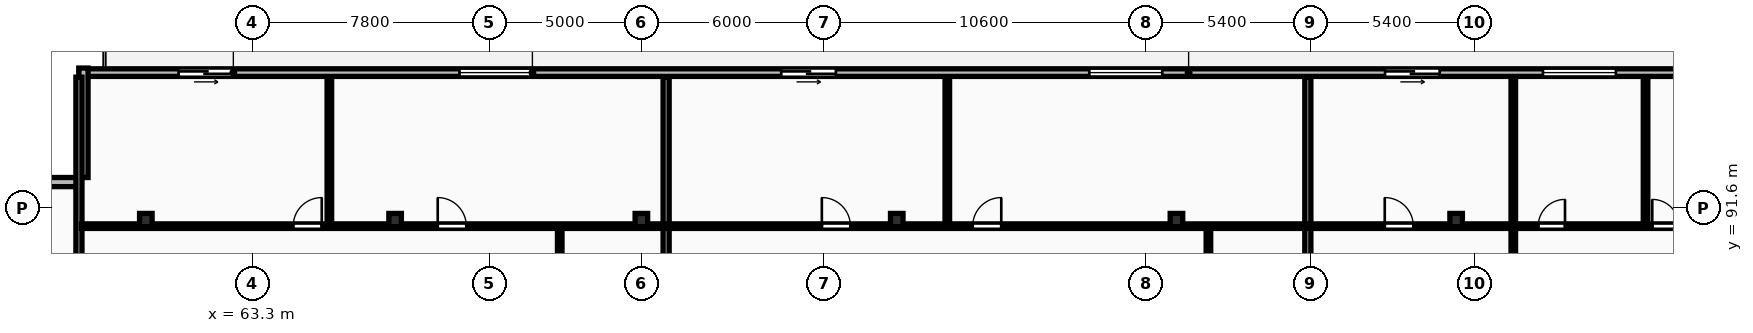
"""IFC4 building model, lengths in metres.
Left out: names, types, materials, properties, quantities, classifications, styles, units other than length and angle.
Written with IfcOpenShell. Run it as: python <this file> out.ifc"""

import sys

from ifc_helpers import new_model, si_unit, direction, frame, frame_2d, origin, origin_2d, place, context, subcontext, project, spatial, rectangle, i_section, extrude, element, fill, save


model = new_model("IFC4")
c1 = context("Model", 3, precision=1e-05, world=origin(), true_north=direction((0.0, 1.0)))
c2 = subcontext(c1, "Body", "Model", "MODEL_VIEW")
j1 = project(units=[si_unit("LENGTHUNIT", "METRE"), si_unit("PLANEANGLEUNIT", "RADIAN")], contexts=[c1])
p1 = place(None, origin())
s1 = spatial("IfcSite", under=j1, at=p1, CompositionType="ELEMENT")
p2 = place(p1, origin())
s2 = spatial("IfcBuilding", under=s1, at=p2, CompositionType="ELEMENT")
p3 = place(p2, frame((0.0, 0.0, 139.3)))
s3 = spatial("IfcBuildingStorey", under=s2, at=p3, CompositionType="ELEMENT", Elevation=139.3)
for number, where, z_axis, x_axis in (
    (1, (59.8, 91.2, 0.0), (0.0, 0.0, 1.0), (1.0, 0.0, 0.0)),
    (2, (68.0, 91.2, 0.0), (0.0, 0.0, 1.0), (1.0, 0.0, 0.0)),
    (3, (76.1, 91.2, 0.0), (0.0, 0.0, 1.0), (1.0, 0.0, 0.0)),
    (4, (84.5, 91.2, 0.0), (0.0, 0.0, 1.0), (1.0, 0.0, 0.0)),
    (5, (93.7, 91.2, 0.0), (0.0, 0.0, 1.0), (1.0, 0.0, 0.0)),
    (6, (102.9, 91.2, 0.0), (0.0, 0.0, 1.0), (1.0, 0.0, 0.0)),
):
    element("IfcColumn", number, at=place(p3, frame(where, z_axis=z_axis, x_axis=x_axis)), inside=s3, PredefinedType="COLUMN", context=c2, shape_type="SweptSolid", body=[
        extrude(i_section(OverallWidth=0.412, OverallDepth=0.437, WebThickness=0.036, FlangeThickness=0.052, FilletRadius=0.015, at=origin_2d()), origin(), (0.0, 0.0, 1.0), 3.6),
    ])
p4 = place(p3, frame((130.6, 96.05, 0.0), z_axis=(0.0, 0.0, 1.0), x_axis=(-1.0, 0.0, 0.0)))
e7 = element("IfcWall", 7, at=p4, inside=s3, PredefinedType="STANDARD", context=c2, shape_type="SweptSolid", body=[
    extrude(rectangle(XDim=73.0, YDim=0.25, at=frame_2d((36.5, 0.0))), origin(), (0.0, 0.0, 1.0), 3.31),
])
p5 = place(p4, frame((67.921, 0.0, 0.0)))
e8 = element("IfcOpeningElement", 8, at=p5, cuts=e7, PredefinedType="OPENING", context=c2, shape_type="SweptSolid", body=[
    extrude(rectangle(XDim=1.8, YDim=2.2, at=frame_2d((0.9, 1.1))), frame((0.0, 0.135, 0.0), z_axis=(0.0, -1.0, 0.0), x_axis=(1.0, 0.0, 0.0)), (0.0, 0.0, 1.0), 0.27),
])
p6 = place(p4, frame((58.084, 0.0, 0.85)))
e9 = element("IfcOpeningElement", 9, at=p6, cuts=e7, PredefinedType="OPENING", context=c2, shape_type="SweptSolid", body=[
    extrude(rectangle(XDim=2.4, YDim=1.9, at=frame_2d((1.2, 0.95))), frame((0.0, 0.135, 0.0), z_axis=(0.0, -1.0, 0.0), x_axis=(1.0, 0.0, 0.0)), (0.0, 0.0, 1.0), 0.27),
])
p7 = place(p4, frame((48.101, 0.0, 0.0)))
e10 = element("IfcOpeningElement", 10, at=p7, cuts=e7, PredefinedType="OPENING", context=c2, shape_type="SweptSolid", body=[
    extrude(rectangle(XDim=1.8, YDim=2.2, at=frame_2d((0.9, 1.1))), frame((0.0, 0.135, 0.0), z_axis=(0.0, -1.0, 0.0), x_axis=(1.0, 0.0, 0.0)), (0.0, 0.0, 1.0), 0.27),
])
p8 = place(p4, frame((37.368, 0.0, 0.85)))
e11 = element("IfcOpeningElement", 11, at=p8, cuts=e7, PredefinedType="OPENING", context=c2, shape_type="SweptSolid", body=[
    extrude(rectangle(XDim=2.4, YDim=1.9, at=frame_2d((1.2, 0.95))), frame((0.0, 0.135, 0.0), z_axis=(0.0, -1.0, 0.0), x_axis=(1.0, 0.0, 0.0)), (0.0, 0.0, 1.0), 0.27),
])
p9 = place(p4, frame((22.445, 0.0, 0.85)))
e12 = element("IfcOpeningElement", 12, at=p9, cuts=e7, PredefinedType="OPENING", context=c2, shape_type="SweptSolid", body=[
    extrude(rectangle(XDim=2.4, YDim=1.9, at=frame_2d((1.2, 0.95))), frame((0.0, 0.135, 0.0), z_axis=(0.0, -1.0, 0.0), x_axis=(1.0, 0.0, 0.0)), (0.0, 0.0, 1.0), 0.27),
])
p10 = place(p4, frame((17.845, 0.0, 0.85)))
e13 = element("IfcOpeningElement", 13, at=p10, cuts=e7, PredefinedType="OPENING", context=c2, shape_type="SweptSolid", body=[
    extrude(rectangle(XDim=2.4, YDim=1.9, at=frame_2d((1.2, 0.95))), frame((0.0, 0.135, 0.0), z_axis=(0.0, -1.0, 0.0), x_axis=(1.0, 0.0, 0.0)), (0.0, 0.0, 1.0), 0.27),
])
p11 = place(p4, frame((28.239, 0.0, 0.0)))
e14 = element("IfcOpeningElement", 14, at=p11, cuts=e7, PredefinedType="OPENING", context=c2, shape_type="SweptSolid", body=[
    extrude(rectangle(XDim=1.8, YDim=2.2, at=frame_2d((0.9, 1.1))), frame((0.0, 0.135, 0.0), z_axis=(0.0, -1.0, 0.0), x_axis=(1.0, 0.0, 0.0)), (0.0, 0.0, 1.0), 0.27),
])
p12 = place(p4, frame((14.599, 0.0, 0.85)))
e15 = element("IfcOpeningElement", 15, at=p12, cuts=e7, PredefinedType="OPENING", context=c2, shape_type="SweptSolid", body=[
    extrude(rectangle(XDim=1.8, YDim=1.8, at=frame_2d((0.9, 0.9))), frame((0.0, 0.135, 0.0), z_axis=(0.0, -1.0, 0.0), x_axis=(1.0, 0.0, 0.0)), (0.0, 0.0, 1.0), 0.27),
])
p13 = place(p4, frame((8.234, 0.0, 0.0)))
e16 = element("IfcOpeningElement", 16, at=p13, cuts=e7, PredefinedType="OPENING", context=c2, shape_type="SweptSolid", body=[
    extrude(rectangle(XDim=1.8, YDim=2.2, at=frame_2d((0.9, 1.1))), frame((0.0, 0.135, 0.0), z_axis=(0.0, -1.0, 0.0), x_axis=(1.0, 0.0, 0.0)), (0.0, 0.0, 1.0), 0.27),
])
p14 = place(p4, frame((0.9, 0.0, 0.85)))
e17 = element("IfcOpeningElement", 17, at=p14, cuts=e7, PredefinedType="OPENING", context=c2, shape_type="SweptSolid", body=[
    extrude(rectangle(XDim=2.4, YDim=1.9, at=frame_2d((1.2, 0.95))), frame((0.0, 0.135, 0.0), z_axis=(0.0, -1.0, 0.0), x_axis=(1.0, 0.0, 0.0)), (0.0, 0.0, 1.0), 0.27),
])
p15 = place(p3, frame((57.75, 96.2, 0.0), z_axis=(0.0, 0.0, 1.0), x_axis=(0.0, -1.0, 0.0)))
e18 = element("IfcWall", 18, at=p15, inside=s3, PredefinedType="STANDARD", context=c2, shape_type="SweptSolid", body=[
    extrude(rectangle(XDim=3.6, YDim=0.3, at=frame_2d((1.8, 0.0))), origin(), (0.0, 0.0, 1.0), 3.31),
])
p16 = place(p3, frame((57.6, 92.45, 0.0), z_axis=(0.0, 0.0, 1.0), x_axis=(-1.0, 0.0, 0.0)))
e19 = element("IfcWall", 19, at=p16, inside=s3, PredefinedType="STANDARD", context=c2, shape_type="SweptSolid", body=[
    extrude(rectangle(XDim=3.6, YDim=0.3, at=frame_2d((1.8, 0.0))), origin(), (0.0, 0.0, 1.0), 3.31),
])
for number, where, z_axis, x_axis in (
    (20, (57.6, 69.83, 0.0), (0.0, 0.0, 1.0), (0.0, 1.0, 0.0)),
    (21, (76.914, 69.83, 0.0), (0.0, 0.0, 1.0), (0.0, 1.0, 0.0)),
):
    element("IfcWall", number, at=place(p3, frame(where, z_axis=z_axis, x_axis=x_axis)), inside=s3, PredefinedType="PARTITIONING", context=c2, shape_type="SweptSolid", body=[
        extrude(rectangle(XDim=26.07, YDim=0.2, at=frame_2d((13.035, 0.0))), origin(), (0.0, 0.0, 1.0), 3.31),
    ])
p17 = place(p3, frame((73.414, 69.81, 0.0), z_axis=(0.0, 0.0, 1.0), x_axis=(0.0, 1.0, 0.0)))
e22 = element("IfcWall", 22, at=p17, inside=s3, PredefinedType="PARTITIONING", context=c2, shape_type="SweptSolid", body=[
    extrude(rectangle(XDim=21.13, YDim=0.15, at=frame_2d((10.565, 0.0))), origin(), (0.0, 0.0, 1.0), 3.31),
])
p18 = place(p17, frame((2.406, 0.0, 0.0)))
e23 = element("IfcOpeningElement", 23, at=p18, cuts=e22, PredefinedType="OPENING", context=c2, shape_type="SweptSolid", body=[
    extrude(rectangle(XDim=0.96, YDim=2.1, at=frame_2d((0.48, 1.05))), frame((0.0, 0.085, 0.0), z_axis=(0.0, -1.0, 0.0), x_axis=(1.0, 0.0, 0.0)), (0.0, 0.0, 1.0), 0.17),
])
p19 = place(p17, frame((6.133, 0.0, 0.0)))
e24 = element("IfcOpeningElement", 24, at=p19, cuts=e22, PredefinedType="OPENING", context=c2, shape_type="SweptSolid", body=[
    extrude(rectangle(XDim=0.88, YDim=2.06, at=frame_2d((0.44, 1.03))), frame((0.0, 0.085, 0.0), z_axis=(0.0, -1.0, 0.0), x_axis=(1.0, 0.0, 0.0)), (0.0, 0.0, 1.0), 0.17),
])
p20 = place(p17, frame((10.145, 0.0, 0.0)))
e25 = element("IfcOpeningElement", 25, at=p20, cuts=e22, PredefinedType="OPENING", context=c2, shape_type="SweptSolid", body=[
    extrude(rectangle(XDim=0.84, YDim=2.04, at=frame_2d((0.42, 1.02))), frame((0.0, 0.085, 0.0), z_axis=(0.0, -1.0, 0.0), x_axis=(1.0, 0.0, 0.0)), (0.0, 0.0, 1.0), 0.17),
])
p21 = place(p3, frame((65.837, 91.08, 0.0), z_axis=(0.0, 0.0, 1.0), x_axis=(0.0, 1.0, 0.0)))
e26 = element("IfcWall", 26, at=p21, inside=s3, PredefinedType="PARTITIONING", context=c2, shape_type="SweptSolid", body=[
    extrude(rectangle(XDim=4.82, YDim=0.15, at=frame_2d((2.41, 0.0))), origin(), (0.0, 0.0, 1.0), 3.31),
])
p22 = place(p3, frame((57.68, 91.0, 0.0), z_axis=(0.0, 0.0, 1.0), x_axis=(1.0, 0.0, 0.0)))
e27 = element("IfcWall", 27, at=p22, inside=s3, PredefinedType="PARTITIONING", context=c2, shape_type="SweptSolid", body=[
    extrude(rectangle(XDim=19.154, YDim=0.15, at=frame_2d((9.577, 0.0))), origin(), (0.0, 0.0, 1.0), 3.003),
])
p23 = place(p22, frame((6.967, 0.0, 0.0)))
e28 = element("IfcOpeningElement", 28, at=p23, cuts=e27, PredefinedType="OPENING", context=c2, shape_type="SweptSolid", body=[
    extrude(rectangle(XDim=0.94, YDim=2.1, at=frame_2d((0.47, 1.05))), frame((0.0, 0.085, 0.0), z_axis=(0.0, -1.0, 0.0), x_axis=(1.0, 0.0, 0.0)), (0.0, 0.0, 1.0), 0.17),
])
p24 = place(p22, frame((11.721, 0.0, 0.0)))
e29 = element("IfcOpeningElement", 29, at=p24, cuts=e27, PredefinedType="OPENING", context=c2, shape_type="SweptSolid", body=[
    extrude(rectangle(XDim=0.94, YDim=2.1, at=frame_2d((0.47, 1.05))), frame((0.0, 0.085, 0.0), z_axis=(0.0, -1.0, 0.0), x_axis=(1.0, 0.0, 0.0)), (0.0, 0.0, 1.0), 0.17),
])
p25 = place(p3, frame((98.021, 69.83, 0.0), z_axis=(0.0, 0.0, 1.0), x_axis=(0.0, 1.0, 0.0)))
e30 = element("IfcWall", 30, at=p25, inside=s3, PredefinedType="PARTITIONING", context=c2, shape_type="SweptSolid", body=[
    extrude(rectangle(XDim=26.07, YDim=0.2, at=frame_2d((13.035, 0.0))), origin(), (0.0, 0.0, 1.0), 3.31),
])
p26 = place(p3, frame((94.751, 69.81, 0.0), z_axis=(0.0, 0.0, 1.0), x_axis=(0.0, 1.0, 0.0)))
e31 = element("IfcWall", 31, at=p26, inside=s3, PredefinedType="PARTITIONING", context=c2, shape_type="SweptSolid", body=[
    extrude(rectangle(XDim=21.13, YDim=0.15, at=frame_2d((10.565, 0.0))), origin(), (0.0, 0.0, 1.0), 3.31),
])
p27 = place(p26, frame((2.406, 0.0, 0.0)))
e32 = element("IfcOpeningElement", 32, at=p27, cuts=e31, PredefinedType="OPENING", context=c2, shape_type="SweptSolid", body=[
    extrude(rectangle(XDim=0.96, YDim=2.1, at=frame_2d((0.48, 1.05))), frame((0.0, 0.085, 0.0), z_axis=(0.0, -1.0, 0.0), x_axis=(1.0, 0.0, 0.0)), (0.0, 0.0, 1.0), 0.17),
])
p28 = place(p26, frame((6.133, 0.0, 0.0)))
e33 = element("IfcOpeningElement", 33, at=p28, cuts=e31, PredefinedType="OPENING", context=c2, shape_type="SweptSolid", body=[
    extrude(rectangle(XDim=0.88, YDim=2.06, at=frame_2d((0.44, 1.03))), frame((0.0, 0.085, 0.0), z_axis=(0.0, -1.0, 0.0), x_axis=(1.0, 0.0, 0.0)), (0.0, 0.0, 1.0), 0.17),
])
p29 = place(p26, frame((11.231, 0.0, 0.0)))
e34 = element("IfcOpeningElement", 34, at=p29, cuts=e31, PredefinedType="OPENING", context=c2, shape_type="SweptSolid", body=[
    extrude(rectangle(XDim=0.84, YDim=2.04, at=frame_2d((0.42, 1.02))), frame((0.0, 0.085, 0.0), z_axis=(0.0, -1.0, 0.0), x_axis=(1.0, 0.0, 0.0)), (0.0, 0.0, 1.0), 0.17),
])
p30 = place(p3, frame((86.163, 91.08, 0.0), z_axis=(0.0, 0.0, 1.0), x_axis=(0.0, 1.0, 0.0)))
e35 = element("IfcWall", 35, at=p30, inside=s3, PredefinedType="PARTITIONING", context=c2, shape_type="SweptSolid", body=[
    extrude(rectangle(XDim=4.82, YDim=0.15, at=frame_2d((2.41, 0.0))), origin(), (0.0, 0.0, 1.0), 3.31),
])
p31 = place(p3, frame((76.994, 91.0, 0.0), z_axis=(0.0, 0.0, 1.0), x_axis=(1.0, 0.0, 0.0)))
e36 = element("IfcWall", 36, at=p31, inside=s3, PredefinedType="PARTITIONING", context=c2, shape_type="SweptSolid", body=[
    extrude(rectangle(XDim=20.947, YDim=0.15, at=frame_2d((10.474, 0.0))), origin(), (0.0, 0.0, 1.0), 3.003),
])
p32 = place(p31, frame((5.042, 0.0, 0.0)))
e37 = element("IfcOpeningElement", 37, at=p32, cuts=e36, PredefinedType="OPENING", context=c2, shape_type="SweptSolid", body=[
    extrude(rectangle(XDim=0.94, YDim=2.1, at=frame_2d((0.47, 1.05))), frame((0.0, 0.085, 0.0), z_axis=(0.0, -1.0, 0.0), x_axis=(1.0, 0.0, 0.0)), (0.0, 0.0, 1.0), 0.17),
])
p33 = place(p31, frame((10.004, 0.0, 0.0)))
e38 = element("IfcOpeningElement", 38, at=p33, cuts=e36, PredefinedType="OPENING", context=c2, shape_type="SweptSolid", body=[
    extrude(rectangle(XDim=0.94, YDim=2.1, at=frame_2d((0.47, 1.05))), frame((0.0, 0.085, 0.0), z_axis=(0.0, -1.0, 0.0), x_axis=(1.0, 0.0, 0.0)), (0.0, 0.0, 1.0), 0.17),
])
p34 = place(p3, frame((109.13, 91.08, 0.0), z_axis=(0.0, 0.0, 1.0), x_axis=(0.0, 1.0, 0.0)))
e39 = element("IfcWall", 39, at=p34, inside=s3, PredefinedType="PARTITIONING", context=c2, shape_type="SweptSolid", body=[
    extrude(rectangle(XDim=4.82, YDim=0.15, at=frame_2d((2.41, 0.0))), origin(), (0.0, 0.0, 1.0), 3.31),
])
p35 = place(p3, frame((104.78, 85.94, 0.0), z_axis=(0.0, 0.0, 1.0), x_axis=(0.0, 1.0, 0.0)))
e40 = element("IfcWall", 40, at=p35, inside=s3, PredefinedType="PARTITIONING", context=c2, shape_type="SweptSolid", body=[
    extrude(rectangle(XDim=9.96, YDim=0.15, at=frame_2d((4.98, 0.0))), origin(), (0.0, 0.0, 1.0), 3.31),
])
p36 = place(p35, frame((2.936, 0.0, 0.0)))
e41 = element("IfcOpeningElement", 41, at=p36, cuts=e40, PredefinedType="OPENING", context=c2, shape_type="SweptSolid", body=[
    extrude(rectangle(XDim=0.92, YDim=2.08, at=frame_2d((0.46, 1.04))), frame((0.0, 0.085, 0.0), z_axis=(0.0, -1.0, 0.0), x_axis=(1.0, 0.0, 0.0)), (0.0, 0.0, 1.0), 0.17),
])
p37 = place(p3, frame((98.101, 91.0, 0.0), z_axis=(0.0, 0.0, 1.0), x_axis=(1.0, 0.0, 0.0)))
e42 = element("IfcWall", 42, at=p37, inside=s3, PredefinedType="PARTITIONING", context=c2, shape_type="SweptSolid", body=[
    extrude(rectangle(XDim=15.879, YDim=0.15, at=frame_2d((7.939, 0.0))), origin(), (0.0, 0.0, 1.0), 3.003),
])
p38 = place(p37, frame((2.45, 0.0, 0.0)))
e43 = element("IfcOpeningElement", 43, at=p38, cuts=e42, PredefinedType="OPENING", context=c2, shape_type="SweptSolid", body=[
    extrude(rectangle(XDim=0.94, YDim=2.1, at=frame_2d((0.47, 1.05))), frame((0.0, 0.085, 0.0), z_axis=(0.0, -1.0, 0.0), x_axis=(1.0, 0.0, 0.0)), (0.0, 0.0, 1.0), 0.17),
])
p39 = place(p37, frame((7.499, 0.0, 0.0)))
e44 = element("IfcOpeningElement", 44, at=p39, cuts=e42, PredefinedType="OPENING", context=c2, shape_type="SweptSolid", body=[
    extrude(rectangle(XDim=0.88, YDim=2.06, at=frame_2d((0.44, 1.03))), frame((0.0, 0.085, 0.0), z_axis=(0.0, -1.0, 0.0), x_axis=(1.0, 0.0, 0.0)), (0.0, 0.0, 1.0), 0.17),
])
p40 = place(p37, frame((11.249, 0.0, 0.0)))
e45 = element("IfcOpeningElement", 45, at=p40, cuts=e42, PredefinedType="OPENING", context=c2, shape_type="SweptSolid", body=[
    extrude(rectangle(XDim=0.88, YDim=2.06, at=frame_2d((0.44, 1.03))), frame((0.0, 0.085, 0.0), z_axis=(0.0, -1.0, 0.0), x_axis=(1.0, 0.0, 0.0)), (0.0, 0.0, 1.0), 0.17),
])
p41 = place(p5, origin())
e46 = element("IfcDoor", 46, at=p41, inside=s3, OperationType="SLIDING_TO_LEFT", PredefinedType="DOOR", context=c2, shape_type="SweptSolid", body=[
    extrude(rectangle(XDim=1.8, YDim=2.2, at=frame_2d((0.9, 1.1))), frame((0.0, 0.025, 0.0), z_axis=(0.0, -1.0, 0.0), x_axis=(1.0, 0.0, 0.0)), (0.0, 0.0, 1.0), 0.05),
])
fill(e8, e46)
p42 = place(p6, origin())
e47 = element("IfcWindow", 47, at=p42, inside=s3, PartitioningType="DOUBLE_PANEL_VERTICAL", PredefinedType="WINDOW", context=c2, shape_type="SweptSolid", body=[
    extrude(rectangle(XDim=2.4, YDim=1.9, at=frame_2d((1.2, 0.95))), frame((0.0, 0.03, 0.0), z_axis=(0.0, -1.0, 0.0), x_axis=(1.0, 0.0, 0.0)), (0.0, 0.0, 1.0), 0.06),
])
fill(e9, e47)
p43 = place(p7, origin())
e48 = element("IfcDoor", 48, at=p43, inside=s3, OperationType="SLIDING_TO_LEFT", PredefinedType="DOOR", context=c2, shape_type="SweptSolid", body=[
    extrude(rectangle(XDim=1.8, YDim=2.2, at=frame_2d((0.9, 1.1))), frame((0.0, 0.025, 0.0), z_axis=(0.0, -1.0, 0.0), x_axis=(1.0, 0.0, 0.0)), (0.0, 0.0, 1.0), 0.05),
])
fill(e10, e48)
p44 = place(p8, origin())
e49 = element("IfcWindow", 49, at=p44, inside=s3, PartitioningType="DOUBLE_PANEL_VERTICAL", PredefinedType="WINDOW", context=c2, shape_type="SweptSolid", body=[
    extrude(rectangle(XDim=2.4, YDim=1.9, at=frame_2d((1.2, 0.95))), frame((0.0, 0.03, 0.0), z_axis=(0.0, -1.0, 0.0), x_axis=(1.0, 0.0, 0.0)), (0.0, 0.0, 1.0), 0.06),
])
fill(e11, e49)
p45 = place(p9, origin())
e50 = element("IfcWindow", 50, at=p45, inside=s3, PartitioningType="DOUBLE_PANEL_VERTICAL", PredefinedType="WINDOW", context=c2, shape_type="SweptSolid", body=[
    extrude(rectangle(XDim=2.4, YDim=1.9, at=frame_2d((1.2, 0.95))), frame((0.0, 0.03, 0.0), z_axis=(0.0, -1.0, 0.0), x_axis=(1.0, 0.0, 0.0)), (0.0, 0.0, 1.0), 0.06),
])
fill(e12, e50)
p46 = place(p11, origin())
e51 = element("IfcDoor", 51, at=p46, inside=s3, OperationType="SLIDING_TO_LEFT", PredefinedType="DOOR", context=c2, shape_type="SweptSolid", body=[
    extrude(rectangle(XDim=1.8, YDim=2.2, at=frame_2d((0.9, 1.1))), frame((0.0, 0.025, 0.0), z_axis=(0.0, -1.0, 0.0), x_axis=(1.0, 0.0, 0.0)), (0.0, 0.0, 1.0), 0.05),
])
fill(e14, e51)
p47 = place(p23, origin())
e52 = element("IfcDoor", 52, at=p47, inside=s3, OperationType="SINGLE_SWING_RIGHT", PredefinedType="DOOR", context=c2, shape_type="SweptSolid", body=[
    extrude(rectangle(XDim=0.94, YDim=2.1, at=frame_2d((0.47, 1.05))), frame((0.0, 0.025, 0.0), z_axis=(0.0, -1.0, 0.0), x_axis=(1.0, 0.0, 0.0)), (0.0, 0.0, 1.0), 0.05),
])
fill(e28, e52)
p48 = place(p24, origin())
e53 = element("IfcDoor", 53, at=p48, inside=s3, OperationType="SINGLE_SWING_LEFT", PredefinedType="DOOR", context=c2, shape_type="SweptSolid", body=[
    extrude(rectangle(XDim=0.94, YDim=2.1, at=frame_2d((0.47, 1.05))), frame((0.0, 0.025, 0.0), z_axis=(0.0, -1.0, 0.0), x_axis=(1.0, 0.0, 0.0)), (0.0, 0.0, 1.0), 0.05),
])
fill(e29, e53)
p49 = place(p32, origin())
e54 = element("IfcDoor", 54, at=p49, inside=s3, OperationType="SINGLE_SWING_LEFT", PredefinedType="DOOR", context=c2, shape_type="SweptSolid", body=[
    extrude(rectangle(XDim=0.94, YDim=2.1, at=frame_2d((0.47, 1.05))), frame((0.0, 0.025, 0.0), z_axis=(0.0, -1.0, 0.0), x_axis=(1.0, 0.0, 0.0)), (0.0, 0.0, 1.0), 0.05),
])
fill(e37, e54)
p50 = place(p33, origin())
e55 = element("IfcDoor", 55, at=p50, inside=s3, OperationType="SINGLE_SWING_RIGHT", PredefinedType="DOOR", context=c2, shape_type="SweptSolid", body=[
    extrude(rectangle(XDim=0.94, YDim=2.1, at=frame_2d((0.47, 1.05))), frame((0.0, 0.025, 0.0), z_axis=(0.0, -1.0, 0.0), x_axis=(1.0, 0.0, 0.0)), (0.0, 0.0, 1.0), 0.05),
])
fill(e38, e55)
p51 = place(p38, origin())
e56 = element("IfcDoor", 56, at=p51, inside=s3, OperationType="SINGLE_SWING_LEFT", PredefinedType="DOOR", context=c2, shape_type="SweptSolid", body=[
    extrude(rectangle(XDim=0.94, YDim=2.1, at=frame_2d((0.47, 1.05))), frame((0.0, 0.025, 0.0), z_axis=(0.0, -1.0, 0.0), x_axis=(1.0, 0.0, 0.0)), (0.0, 0.0, 1.0), 0.05),
])
fill(e43, e56)
p52 = place(p39, origin())
e57 = element("IfcDoor", 57, at=p52, inside=s3, OperationType="SINGLE_SWING_RIGHT", PredefinedType="DOOR", context=c2, shape_type="SweptSolid", body=[
    extrude(rectangle(XDim=0.88, YDim=2.06, at=frame_2d((0.44, 1.03))), frame((0.0, 0.025, 0.0), z_axis=(0.0, -1.0, 0.0), x_axis=(1.0, 0.0, 0.0)), (0.0, 0.0, 1.0), 0.05),
])
fill(e44, e57)
p53 = place(p40, origin())
e58 = element("IfcDoor", 58, at=p53, inside=s3, OperationType="SINGLE_SWING_LEFT", PredefinedType="DOOR", context=c2, shape_type="SweptSolid", body=[
    extrude(rectangle(XDim=0.88, YDim=2.06, at=frame_2d((0.44, 1.03))), frame((0.0, 0.025, 0.0), z_axis=(0.0, -1.0, 0.0), x_axis=(1.0, 0.0, 0.0)), (0.0, 0.0, 1.0), 0.05),
])
fill(e45, e58)
save(model, sys.argv[1])
